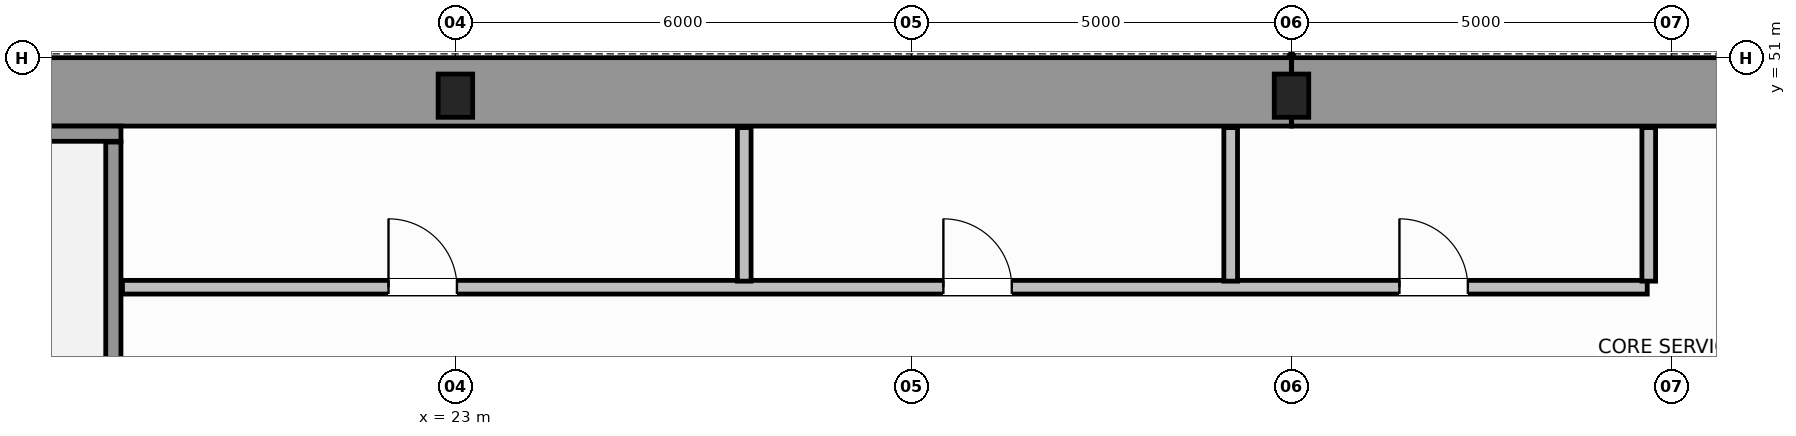
"""IFC4 building model, lengths in metres.
Left out: names, types, materials, properties, quantities, classifications, styles, units other than length and angle.
Written with IfcOpenShell. Run it as: python <this file> out.ifc"""

import sys

from ifc_helpers import new_model, si_unit, direction, frame, frame_2d, origin, origin_2d, place, context, subcontext, project, spatial, rectangle, i_section, extrude, source, transform, mapped, element, fill, save


model = new_model("IFC4")
c1 = context("Model", 3, precision=1e-05, world=origin(), true_north=direction((0.0, 1.0)))
c2 = subcontext(c1, "Body", "Model", "MODEL_VIEW")
j1 = project(units=[si_unit("LENGTHUNIT", "METRE"), si_unit("PLANEANGLEUNIT", "RADIAN")], contexts=[c1])
p1 = place(None, origin())
s1 = spatial("IfcSite", under=j1, at=p1, CompositionType="ELEMENT")
p2 = place(p1, origin())
s2 = spatial("IfcBuilding", under=s1, at=p2, CompositionType="ELEMENT")
p3 = place(p2, frame((0.0, 0.0, 41.6)))
s3 = spatial("IfcBuildingStorey", under=s2, at=p3, CompositionType="ELEMENT", Elevation=41.6)
m1 = source(origin(), c2, "Body", "SweptSolid", [
    extrude(i_section(OverallWidth=0.454, OverallDepth=0.569, WebThickness=0.078, FlangeThickness=0.08, FilletRadius=0.015, at=origin_2d()), origin(), (0.0, 0.0, 1.0), 3.8),
])
for number, where, z_axis, x_axis in (
    (1, (23.0, 50.5, 0.0), (0.0, 0.0, 1.0), (1.0, 0.0, 0.0)),
    (2, (34.0, 50.5, 0.0), (0.0, 0.0, 1.0), (1.0, 0.0, 0.0)),
):
    element("IfcColumn", number, at=place(p3, frame(where, z_axis=z_axis, x_axis=x_axis)), inside=s3, PredefinedType="COLUMN", context=c2, shape_type="MappedRepresentation", body=[
        mapped(m1, transform((0.0, 0.0, 0.0), scale=1.0)),
    ])
for number, where, z_axis, x_axis in (
    (3, (14.454, 50.55, 0.0), (0.0, 0.0, 1.0), (1.0, 0.0, 0.0)),
    (4, (34.002, 50.55, 0.0), (0.0, 0.0, 1.0), (1.0, 0.0, 0.0)),
):
    element("IfcWall", number, at=place(p3, frame(where, z_axis=z_axis, x_axis=x_axis)), inside=s3, PredefinedType="SHEAR", context=c2, shape_type="SweptSolid", body=[
        extrude(rectangle(XDim=19.544, YDim=0.9, at=frame_2d((9.772, 0.0))), origin(), (0.0, 0.0, 1.0), 3.8),
    ])
p4 = place(p3, frame((14.45, 50.0, 0.0), z_axis=(0.0, 0.0, 1.0), x_axis=(1.0, 0.0, 0.0)))
e5 = element("IfcWall", 5, at=p4, inside=s3, PredefinedType="SOLIDWALL", context=c2, shape_type="SweptSolid", body=[
    extrude(rectangle(XDim=4.15, YDim=0.2, at=frame_2d((2.075, 0.0))), origin(), (0.0, 0.0, 1.0), 3.8),
])
p5 = place(p3, frame((18.5, 39.96, 0.0), z_axis=(0.0, 0.0, 1.0), x_axis=(0.0, 1.0, 0.0)))
e6 = element("IfcWall", 6, at=p5, inside=s3, PredefinedType="SOLIDWALL", context=c2, shape_type="SweptSolid", body=[
    extrude(rectangle(XDim=9.93, YDim=0.2, at=frame_2d((4.965, 0.0))), origin(), (0.0, 0.0, 1.0), 3.8),
])
p6 = place(p3, frame((18.62, 47.98, 0.0), z_axis=(0.0, 0.0, 1.0), x_axis=(1.0, 0.0, 0.0)))
e7 = element("IfcWall", 7, at=p6, inside=s3, PredefinedType="PLUMBINGWALL", context=c2, shape_type="SweptSolid", body=[
    extrude(rectangle(XDim=20.06, YDim=0.18, at=frame_2d((10.03, 0.0))), origin(), (0.0, 0.0, 1.0), 3.58),
])
p7 = place(p6, frame((3.5, 0.0, 0.0)))
e8 = element("IfcOpeningElement", 8, at=p7, cuts=e7, PredefinedType="OPENING", context=c2, shape_type="SweptSolid", body=[
    extrude(rectangle(XDim=0.9, YDim=2.15, at=frame_2d((0.45, 1.075))), frame((0.0, 0.1, 0.0), z_axis=(0.0, -1.0, 0.0), x_axis=(1.0, 0.0, 0.0)), (0.0, 0.0, 1.0), 0.2),
])
p8 = place(p6, frame((10.8, 0.0, 0.0)))
e9 = element("IfcOpeningElement", 9, at=p8, cuts=e7, PredefinedType="OPENING", context=c2, shape_type="SweptSolid", body=[
    extrude(rectangle(XDim=0.9, YDim=2.15, at=frame_2d((0.45, 1.075))), frame((0.0, 0.1, 0.0), z_axis=(0.0, -1.0, 0.0), x_axis=(1.0, 0.0, 0.0)), (0.0, 0.0, 1.0), 0.2),
])
p9 = place(p6, frame((16.8, 0.0, 0.0)))
e10 = element("IfcOpeningElement", 10, at=p9, cuts=e7, PredefinedType="OPENING", context=c2, shape_type="SweptSolid", body=[
    extrude(rectangle(XDim=0.9, YDim=2.15, at=frame_2d((0.45, 1.075))), frame((0.0, 0.1, 0.0), z_axis=(0.0, -1.0, 0.0), x_axis=(1.0, 0.0, 0.0)), (0.0, 0.0, 1.0), 0.2),
])
for number, where, z_axis, x_axis in (
    (11, (26.8, 48.06, 0.0), (0.0, 0.0, 1.0), (0.0, 1.0, 0.0)),
    (12, (33.2, 48.06, 0.0), (0.0, 0.0, 1.0), (0.0, 1.0, 0.0)),
    (13, (38.7, 48.06, 0.0), (0.0, 0.0, 1.0), (0.0, 1.0, 0.0)),
):
    element("IfcWall", number, at=place(p3, frame(where, z_axis=z_axis, x_axis=x_axis)), inside=s3, PredefinedType="PLUMBINGWALL", context=c2, shape_type="SweptSolid", body=[
        extrude(rectangle(XDim=2.02, YDim=0.18, at=frame_2d((1.01, 0.0))), origin(), (0.0, 0.0, 1.0), 3.58),
    ])
m2 = source(origin(), c2, "Body", "SweptSolid", [
    extrude(rectangle(XDim=0.9, YDim=2.15, at=frame_2d((0.45, 1.075))), frame((0.0, 0.025, 0.0), z_axis=(0.0, -1.0, 0.0), x_axis=(1.0, 0.0, 0.0)), (0.0, 0.0, 1.0), 0.05),
])
p10 = place(p7, origin())
e14 = element("IfcDoor", 14, at=p10, inside=s3, OperationType="SINGLE_SWING_LEFT", PredefinedType="DOOR", context=c2, shape_type="MappedRepresentation", body=[
    mapped(m2, transform((0.0, 0.0, 0.0), scale=1.0)),
])
fill(e8, e14)
p11 = place(p8, origin())
e15 = element("IfcDoor", 15, at=p11, inside=s3, OperationType="SINGLE_SWING_RIGHT", PredefinedType="DOOR", context=c2, shape_type="MappedRepresentation", body=[
    mapped(m2, transform((0.0, 0.0, 0.0), scale=1.0)),
])
fill(e9, e15)
p12 = place(p9, origin())
e16 = element("IfcDoor", 16, at=p12, inside=s3, OperationType="SINGLE_SWING_LEFT", PredefinedType="DOOR", context=c2, shape_type="MappedRepresentation", body=[
    mapped(m2, transform((0.0, 0.0, 0.0), scale=1.0)),
])
fill(e10, e16)
save(model, sys.argv[1])
